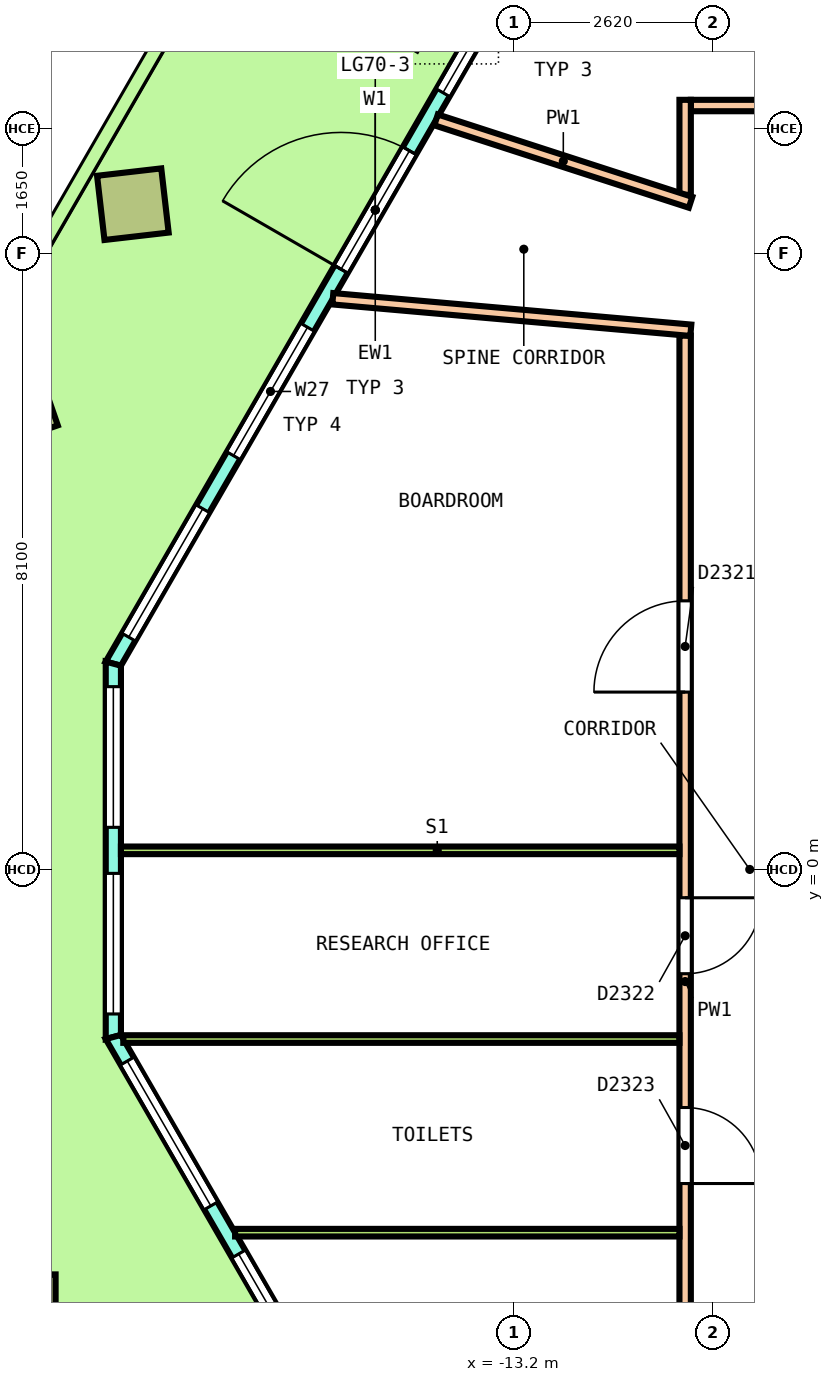
"""IFC4 building model, lengths in metres.
Left out: names, types, materials, properties, quantities, classifications, styles, units other than length and angle.
Written with IfcOpenShell. Run it as: python <this file> out.ifc"""

import sys

from ifc_helpers import new_model, si_unit, direction, frame, frame_2d, origin, origin_2d, place, context, subcontext, project, spatial, polyline, rectangle, outline, extrude, element, fill, save


model = new_model("IFC4")
c1 = context("Model", 3, precision=1e-05, world=origin(), true_north=direction((0.0, 1.0)))
c2 = subcontext(c1, "Body", "Model", "MODEL_VIEW")
j1 = project(units=[si_unit("LENGTHUNIT", "METRE"), si_unit("PLANEANGLEUNIT", "RADIAN")], contexts=[c1])
p1 = place(None, origin())
s1 = spatial("IfcSite", under=j1, at=p1, CompositionType="ELEMENT")
p2 = place(p1, origin())
s2 = spatial("IfcBuilding", under=s1, at=p2, CompositionType="ELEMENT")
p3 = place(p2, frame((0.0, 0.0, 316.6)))
s3 = spatial("IfcBuildingStorey", under=s2, at=p3, CompositionType="ELEMENT", Elevation=316.6)
p4 = place(p3, frame((-18.216, 8.752, 0.0), z_axis=(-0.025405368728, 0.018786601612, 0.999500690765), x_axis=(-0.498611651915, -0.866817929973, 0.00361895723)))
e1 = element("IfcColumn", 1, at=p4, inside=s3, PredefinedType="COLUMN", context=c2, shape_type="SweptSolid", body=[
    extrude(rectangle(XDim=0.85, YDim=0.85, at=origin_2d()), origin(), (0.0, 0.0, 1.0), 3.652),
])
p5 = place(p3, frame((-19.744, 6.105, 0.0), z_axis=(-0.021727128018, 0.025136615799, 0.999447888814), x_axis=(-0.500914849261, -0.865428226672, 0.010876500817)))
e2 = element("IfcColumn", 2, at=p5, inside=s3, PredefinedType="COLUMN", context=c2, shape_type="SweptSolid", body=[
    extrude(rectangle(XDim=0.85, YDim=0.85, at=origin_2d()), origin(), (0.0, 0.0, 1.0), 3.652),
])
p6 = place(p3, frame((-19.657, -5.753, 0.0), z_axis=(-0.010900436936, 0.018791550792, 0.999764001199), x_axis=(0.501923504145, -0.864639146771, 0.021724222837)))
e3 = element("IfcColumn", 3, at=p6, inside=s3, PredefinedType="COLUMN", context=c2, shape_type="SweptSolid", body=[
    extrude(rectangle(XDim=0.85, YDim=0.85, at=origin_2d()), origin(), (0.0, 0.0, 1.0), 3.651),
])
p7 = place(p3, frame((-11.581, 14.644, 0.0), z_axis=(0.0, 0.0, 1.0), x_axis=(-0.500000477412, -0.866025128151, 0.0)))
e4 = element("IfcWall", 4, at=p7, inside=s3, PredefinedType="SOLIDWALL", context=c2, shape_type="SweptSolid", body=[
    extrude(outline(polyline([(-0.027, -0.1), (1.038, -0.1), (2.102, -0.1), (3.167, -0.1), (4.231, -0.1), (5.295, -0.1), (6.36, -0.1), (7.424, -0.1), (8.489, -0.1), (9.553, -0.1), (10.617, -0.1), (11.682, -0.1), (12.746, -0.1), (13.811, -0.1), (13.757, 0.1), (12.701, 0.1), (11.645, 0.1), (10.588, 0.1), (9.532, 0.1), (8.476, 0.1), (7.42, 0.1), (6.364, 0.1), (5.308, 0.1), (4.251, 0.1), (3.195, 0.1), (2.139, 0.1), (1.083, 0.1), (0.027, 0.1), (-0.027, -0.1)])), origin(), (0.0, 0.0, 1.0), 3.7),
])
p8 = place(p7, frame((0.403, 0.0, 0.1)))
e5 = element("IfcOpeningElement", 5, at=p8, cuts=e4, PredefinedType="OPENING", context=c2, shape_type="SweptSolid", body=[
    extrude(rectangle(XDim=1.95, YDim=2.9, at=frame_2d((0.975, 1.45))), frame((0.0, 0.11, 0.0), z_axis=(0.0, -1.0, 0.0), x_axis=(1.0, 0.0, 0.0)), (0.0, 0.0, 1.0), 0.22),
])
p9 = place(p7, frame((3.16, 0.0, 0.1)))
e6 = element("IfcOpeningElement", 6, at=p9, cuts=e4, PredefinedType="OPENING", context=c2, shape_type="SweptSolid", body=[
    extrude(rectangle(XDim=1.95, YDim=2.9, at=frame_2d((0.975, 1.45))), frame((0.0, 0.11, 0.0), z_axis=(0.0, -1.0, 0.0), x_axis=(1.0, 0.0, 0.0)), (0.0, 0.0, 1.0), 0.22),
])
p10 = place(p7, frame((5.992, 0.0, 0.0)))
e7 = element("IfcOpeningElement", 7, at=p10, cuts=e4, PredefinedType="OPENING", context=c2, shape_type="SweptSolid", body=[
    extrude(rectangle(XDim=1.8, YDim=2.4, at=frame_2d((0.9, 1.2))), frame((0.0, 0.11, 0.0), z_axis=(0.0, -1.0, 0.0), x_axis=(1.0, 0.0, 0.0)), (0.0, 0.0, 1.0), 0.22),
])
p11 = place(p7, frame((5.992, 0.0, 2.55)))
e8 = element("IfcOpeningElement", 8, at=p11, cuts=e4, PredefinedType="OPENING", context=c2, shape_type="SweptSolid", body=[
    extrude(rectangle(XDim=1.8, YDim=0.45, at=frame_2d((0.9, 0.225))), frame((0.0, 0.11, 0.0), z_axis=(0.0, -1.0, 0.0), x_axis=(1.0, 0.0, 0.0)), (0.0, 0.0, 1.0), 0.22),
])
p12 = place(p7, frame((8.674, 0.0, 0.1)))
e9 = element("IfcOpeningElement", 9, at=p12, cuts=e4, PredefinedType="OPENING", context=c2, shape_type="SweptSolid", body=[
    extrude(rectangle(XDim=1.95, YDim=2.9, at=frame_2d((0.975, 1.45))), frame((0.0, 0.11, 0.0), z_axis=(0.0, -1.0, 0.0), x_axis=(1.0, 0.0, 0.0)), (0.0, 0.0, 1.0), 0.22),
])
p13 = place(p7, frame((11.43, 0.0, 0.1)))
e10 = element("IfcOpeningElement", 10, at=p13, cuts=e4, PredefinedType="OPENING", context=c2, shape_type="SweptSolid", body=[
    extrude(rectangle(XDim=1.95, YDim=2.9, at=frame_2d((0.975, 1.45))), frame((0.0, 0.11, 0.0), z_axis=(0.0, -1.0, 0.0), x_axis=(1.0, 0.0, 0.0)), (0.0, 0.0, 1.0), 0.22),
])
p14 = place(p3, frame((-18.473, 2.707, 0.0), z_axis=(0.0, 0.0, 1.0), x_axis=(0.0, -1.0, 0.0)))
e11 = element("IfcWall", 11, at=p14, inside=s3, PredefinedType="SOLIDWALL", context=c2, shape_type="SweptSolid", body=[
    extrude(outline(polyline([(-0.027, -0.1), (1.214, -0.1), (2.456, -0.1), (3.697, -0.1), (4.938, -0.1), (4.885, 0.1), (3.67, 0.1), (2.456, 0.1), (1.241, 0.1), (0.027, 0.1), (-0.027, -0.1)])), origin(), (0.0, 0.0, 1.0), 3.7),
])
p15 = place(p14, frame((0.303, 0.0, 0.1)))
e12 = element("IfcOpeningElement", 12, at=p15, cuts=e11, PredefinedType="OPENING", context=c2, shape_type="SweptSolid", body=[
    extrude(rectangle(XDim=1.85, YDim=2.9, at=frame_2d((0.925, 1.45))), frame((0.0, 0.11, 0.0), z_axis=(0.0, -1.0, 0.0), x_axis=(1.0, 0.0, 0.0)), (0.0, 0.0, 1.0), 0.22),
])
p16 = place(p14, frame((2.759, 0.0, 0.1)))
e13 = element("IfcOpeningElement", 13, at=p16, cuts=e11, PredefinedType="OPENING", context=c2, shape_type="SweptSolid", body=[
    extrude(rectangle(XDim=1.85, YDim=2.9, at=frame_2d((0.925, 1.45))), frame((0.0, 0.11, 0.0), z_axis=(0.0, -1.0, 0.0), x_axis=(1.0, 0.0, 0.0)), (0.0, 0.0, 1.0), 0.22),
])
p17 = place(p3, frame((-18.473, -2.204, 0.0), z_axis=(0.0, 0.0, 1.0), x_axis=(0.499995013995, -0.866028282437, 0.0)))
e14 = element("IfcWall", 14, at=p17, inside=s3, PredefinedType="SOLIDWALL", context=c2, shape_type="SweptSolid", body=[
    extrude(outline(polyline([(-0.027, -0.1), (1.024, -0.1), (2.074, -0.1), (3.125, -0.1), (4.176, -0.1), (5.226, -0.1), (6.277, -0.1), (7.327, -0.1), (8.378, -0.1), (9.428, -0.1), (10.479, -0.1), (11.53, -0.1), (12.58, -0.1), (13.631, -0.1), (14.681, -0.1), (14.628, 0.1), (13.585, 0.1), (12.542, 0.1), (11.499, 0.1), (10.456, 0.1), (9.413, 0.1), (8.37, 0.1), (7.327, 0.1), (6.284, 0.1), (5.241, 0.1), (4.198, 0.1), (3.156, 0.1), (2.113, 0.1), (1.07, 0.1), (0.027, 0.1), (-0.027, -0.1)])), origin(), (0.0, 0.0, 1.0), 3.7),
])
p18 = place(p17, frame((0.365, 0.0, 0.1)))
e15 = element("IfcOpeningElement", 15, at=p18, cuts=e14, PredefinedType="OPENING", context=c2, shape_type="SweptSolid", body=[
    extrude(rectangle(XDim=2.2, YDim=2.9, at=frame_2d((1.1, 1.45))), frame((0.0, 0.11, 0.0), z_axis=(0.0, -1.0, 0.0), x_axis=(1.0, 0.0, 0.0)), (0.0, 0.0, 1.0), 0.22),
])
p19 = place(p17, frame((3.296, 0.0, 0.1)))
e16 = element("IfcOpeningElement", 16, at=p19, cuts=e14, PredefinedType="OPENING", context=c2, shape_type="SweptSolid", body=[
    extrude(rectangle(XDim=2.2, YDim=2.9, at=frame_2d((1.1, 1.45))), frame((0.0, 0.11, 0.0), z_axis=(0.0, -1.0, 0.0), x_axis=(1.0, 0.0, 0.0)), (0.0, 0.0, 1.0), 0.22),
])
p20 = place(p17, frame((6.427, 0.0, 0.0)))
e17 = element("IfcOpeningElement", 17, at=p20, cuts=e14, PredefinedType="OPENING", context=c2, shape_type="SweptSolid", body=[
    extrude(rectangle(XDim=1.8, YDim=2.4, at=frame_2d((0.9, 1.2))), frame((0.0, 0.11, 0.0), z_axis=(0.0, -1.0, 0.0), x_axis=(1.0, 0.0, 0.0)), (0.0, 0.0, 1.0), 0.22),
])
p21 = place(p17, frame((6.427, 0.0, 2.55)))
e18 = element("IfcOpeningElement", 18, at=p21, cuts=e14, PredefinedType="OPENING", context=c2, shape_type="SweptSolid", body=[
    extrude(rectangle(XDim=1.8, YDim=0.45, at=frame_2d((0.9, 0.225))), frame((0.0, 0.11, 0.0), z_axis=(0.0, -1.0, 0.0), x_axis=(1.0, 0.0, 0.0)), (0.0, 0.0, 1.0), 0.22),
])
p22 = place(p17, frame((9.158, 0.0, 0.1)))
e19 = element("IfcOpeningElement", 19, at=p22, cuts=e14, PredefinedType="OPENING", context=c2, shape_type="SweptSolid", body=[
    extrude(rectangle(XDim=2.2, YDim=2.9, at=frame_2d((1.1, 1.45))), frame((0.0, 0.11, 0.0), z_axis=(0.0, -1.0, 0.0), x_axis=(1.0, 0.0, 0.0)), (0.0, 0.0, 1.0), 0.22),
])
p23 = place(p17, frame((12.089, 0.0, 0.1)))
e20 = element("IfcOpeningElement", 20, at=p23, cuts=e14, PredefinedType="OPENING", context=c2, shape_type="SweptSolid", body=[
    extrude(rectangle(XDim=2.2, YDim=2.9, at=frame_2d((1.1, 1.45))), frame((0.0, 0.11, 0.0), z_axis=(0.0, -1.0, 0.0), x_axis=(1.0, 0.0, 0.0)), (0.0, 0.0, 1.0), 0.22),
])
p24 = place(p3, frame((-10.875, 10.05, 0.0), z_axis=(0.0, 0.0, 1.0), x_axis=(1.0, 0.0, 0.0)))
e21 = element("IfcWall", 21, at=p24, inside=s3, PredefinedType="PARTITIONING", context=c2, shape_type="SweptSolid", body=[
    extrude(rectangle(XDim=21.775, YDim=0.15, at=frame_2d((10.887, 0.0))), origin(), (0.0, 0.0, 1.0), 3.05),
])
p25 = place(p24, frame((17.26, 0.0, 0.0)))
e22 = element("IfcOpeningElement", 22, at=p25, cuts=e21, PredefinedType="OPENING", context=c2, shape_type="SweptSolid", body=[
    extrude(rectangle(XDim=1.2, YDim=2.1, at=frame_2d((0.6, 1.05))), frame((0.0, 0.085, 0.0), z_axis=(0.0, -1.0, 0.0), x_axis=(1.0, 0.0, 0.0)), (0.0, 0.0, 1.0), 0.17),
])
p26 = place(p24, frame((11.746, 0.0, 0.0)))
e23 = element("IfcOpeningElement", 23, at=p26, cuts=e21, PredefinedType="OPENING", context=c2, shape_type="SweptSolid", body=[
    extrude(rectangle(XDim=1.2, YDim=2.1, at=frame_2d((0.6, 1.05))), frame((0.0, 0.085, 0.0), z_axis=(0.0, -1.0, 0.0), x_axis=(1.0, 0.0, 0.0)), (0.0, 0.0, 1.0), 0.17),
])
p27 = place(p24, frame((5.963, 0.0, 0.0)))
e24 = element("IfcOpeningElement", 24, at=p27, cuts=e21, PredefinedType="OPENING", context=c2, shape_type="SweptSolid", body=[
    extrude(rectangle(XDim=1.0, YDim=2.1, at=frame_2d((0.5, 1.05))), frame((0.0, 0.085, 0.0), z_axis=(0.0, -1.0, 0.0), x_axis=(1.0, 0.0, 0.0)), (0.0, 0.0, 1.0), 0.17),
])
p28 = place(p24, frame((1.223, 0.0, 0.0)))
e25 = element("IfcOpeningElement", 25, at=p28, cuts=e21, PredefinedType="OPENING", context=c2, shape_type="SweptSolid", body=[
    extrude(rectangle(XDim=1.0, YDim=2.1, at=frame_2d((0.5, 1.05))), frame((0.0, 0.085, 0.0), z_axis=(0.0, -1.0, 0.0), x_axis=(1.0, 0.0, 0.0)), (0.0, 0.0, 1.0), 0.17),
])
p29 = place(p3, frame((-10.95, -9.975, 0.0), z_axis=(0.0, 0.0, 1.0), x_axis=(0.0, 1.0, 0.0)))
e26 = element("IfcWall", 26, at=p29, inside=s3, PredefinedType="PARTITIONING", context=c2, shape_type="SweptSolid", body=[
    extrude(rectangle(XDim=17.0, YDim=0.15, at=frame_2d((8.5, 0.0))), origin(), (0.0, 0.0, 1.0), 3.05),
])
p30 = place(p29, frame((12.308, 0.0, 0.0)))
e27 = element("IfcOpeningElement", 27, at=p30, cuts=e26, PredefinedType="OPENING", context=c2, shape_type="SweptSolid", body=[
    extrude(rectangle(XDim=1.2, YDim=2.1, at=frame_2d((0.6, 1.05))), frame((0.0, 0.085, 0.0), z_axis=(0.0, -1.0, 0.0), x_axis=(1.0, 0.0, 0.0)), (0.0, 0.0, 1.0), 0.17),
])
p31 = place(p29, frame((8.603, 0.0, 0.0)))
e28 = element("IfcOpeningElement", 28, at=p31, cuts=e26, PredefinedType="OPENING", context=c2, shape_type="SweptSolid", body=[
    extrude(rectangle(XDim=1.0, YDim=2.1, at=frame_2d((0.5, 1.05))), frame((0.0, 0.085, 0.0), z_axis=(0.0, -1.0, 0.0), x_axis=(1.0, 0.0, 0.0)), (0.0, 0.0, 1.0), 0.17),
])
p32 = place(p29, frame((5.843, 0.0, 0.0)))
e29 = element("IfcOpeningElement", 29, at=p32, cuts=e26, PredefinedType="OPENING", context=c2, shape_type="SweptSolid", body=[
    extrude(rectangle(XDim=1.0, YDim=2.1, at=frame_2d((0.5, 1.05))), frame((0.0, 0.085, 0.0), z_axis=(0.0, -1.0, 0.0), x_axis=(1.0, 0.0, 0.0)), (0.0, 0.0, 1.0), 0.17),
])
p33 = place(p29, frame((1.525, 0.0, 0.0)))
e30 = element("IfcOpeningElement", 30, at=p33, cuts=e26, PredefinedType="OPENING", context=c2, shape_type="SweptSolid", body=[
    extrude(rectangle(XDim=1.0, YDim=2.1, at=frame_2d((0.5, 1.05))), frame((0.0, 0.085, 0.0), z_axis=(0.0, -1.0, 0.0), x_axis=(1.0, 0.0, 0.0)), (0.0, 0.0, 1.0), 0.17),
])
p34 = place(p3, frame((-10.95, 8.875, 0.0), z_axis=(0.0, 0.0, 1.0), x_axis=(0.0, 1.0, 0.0)))
e31 = element("IfcWall", 31, at=p34, inside=s3, PredefinedType="PARTITIONING", context=c2, shape_type="SweptSolid", body=[
    extrude(rectangle(XDim=1.25, YDim=0.15, at=frame_2d((0.625, 0.0))), origin(), (0.0, 0.0, 1.0), 3.05),
])
p35 = place(p3, frame((-14.227, 9.861, 0.0), z_axis=(0.0, 0.0, 1.0), x_axis=(0.951360824749, -0.308078855382, 0.0)))
e32 = element("IfcWall", 32, at=p35, inside=s3, PredefinedType="PARTITIONING", context=c2, shape_type="SweptSolid", body=[
    extrude(rectangle(XDim=3.519, YDim=0.15, at=frame_2d((1.76, 0.0))), origin(), (0.0, 0.0, 1.0), 3.05),
])
p36 = place(p3, frame((-15.585, 7.508, 0.0), z_axis=(0.0, 0.0, 1.0), x_axis=(0.996149370473, -0.087672297261, 0.0)))
e33 = element("IfcWall", 33, at=p36, inside=s3, PredefinedType="PARTITIONING", context=c2, shape_type="SweptSolid", body=[
    extrude(rectangle(XDim=4.729, YDim=0.15, at=frame_2d((2.364, 0.0))), origin(), (0.0, 0.0, 1.0), 3.05),
])
p37 = place(p3, frame((-18.373, 0.251, 0.0), z_axis=(0.0, 0.0, 1.0), x_axis=(1.0, 0.0, 0.0)))
e34 = element("IfcWall", 34, at=p37, inside=s3, PredefinedType="PARTITIONING", context=c2, shape_type="SweptSolid", body=[
    extrude(rectangle(XDim=7.348, YDim=0.1, at=frame_2d((3.674, 0.0))), origin(), (0.0, 0.0, 1.0), 3.05),
])
p38 = place(p3, frame((-18.342, -2.231, 0.0), z_axis=(0.0, 0.0, 1.0), x_axis=(1.0, 0.0, 0.0)))
e35 = element("IfcWall", 35, at=p38, inside=s3, PredefinedType="PARTITIONING", context=c2, shape_type="SweptSolid", body=[
    extrude(rectangle(XDim=7.317, YDim=0.1, at=frame_2d((3.658, 0.0))), origin(), (0.0, 0.0, 1.0), 3.05),
])
p39 = place(p3, frame((-16.871, -4.779, 0.0), z_axis=(0.0, 0.0, 1.0), x_axis=(1.0, 0.0, 0.0)))
e36 = element("IfcWall", 36, at=p39, inside=s3, PredefinedType="PARTITIONING", context=c2, shape_type="SweptSolid", body=[
    extrude(rectangle(XDim=5.846, YDim=0.1, at=frame_2d((2.923, 0.0))), origin(), (0.0, 0.0, 1.0), 3.05),
])
p40 = place(p9, origin())
e37 = element("IfcWindow", 37, at=p40, inside=s3, PartitioningType="SINGLE_PANEL", PredefinedType="WINDOW", context=c2, shape_type="SweptSolid", body=[
    extrude(rectangle(XDim=1.95, YDim=2.9, at=frame_2d((0.975, 1.45))), frame((0.0, 0.03, 0.0), z_axis=(0.0, -1.0, 0.0), x_axis=(1.0, 0.0, 0.0)), (0.0, 0.0, 1.0), 0.06),
])
fill(e6, e37)
p41 = place(p10, origin())
e38 = element("IfcDoor", 38, at=p41, inside=s3, OperationType="DOUBLE_DOOR_SINGLE_SWING", PredefinedType="DOOR", context=c2, shape_type="SweptSolid", body=[
    extrude(rectangle(XDim=1.8, YDim=2.4, at=frame_2d((0.9, 1.2))), frame((0.0, 0.025, 0.0), z_axis=(0.0, -1.0, 0.0), x_axis=(1.0, 0.0, 0.0)), (0.0, 0.0, 1.0), 0.05),
])
fill(e7, e38)
p42 = place(p11, origin())
e39 = element("IfcWindow", 39, at=p42, inside=s3, PartitioningType="SINGLE_PANEL", PredefinedType="WINDOW", context=c2, shape_type="SweptSolid", body=[
    extrude(rectangle(XDim=1.8, YDim=0.45, at=frame_2d((0.9, 0.225))), frame((0.0, 0.03, 0.0), z_axis=(0.0, -1.0, 0.0), x_axis=(1.0, 0.0, 0.0)), (0.0, 0.0, 1.0), 0.06),
])
fill(e8, e39)
p43 = place(p12, origin())
e40 = element("IfcWindow", 40, at=p43, inside=s3, PartitioningType="SINGLE_PANEL", PredefinedType="WINDOW", context=c2, shape_type="SweptSolid", body=[
    extrude(rectangle(XDim=1.95, YDim=2.9, at=frame_2d((0.975, 1.45))), frame((0.0, 0.03, 0.0), z_axis=(0.0, -1.0, 0.0), x_axis=(1.0, 0.0, 0.0)), (0.0, 0.0, 1.0), 0.06),
])
fill(e9, e40)
p44 = place(p13, origin())
e41 = element("IfcWindow", 41, at=p44, inside=s3, PartitioningType="SINGLE_PANEL", PredefinedType="WINDOW", context=c2, shape_type="SweptSolid", body=[
    extrude(rectangle(XDim=1.95, YDim=2.9, at=frame_2d((0.975, 1.45))), frame((0.0, 0.03, 0.0), z_axis=(0.0, -1.0, 0.0), x_axis=(1.0, 0.0, 0.0)), (0.0, 0.0, 1.0), 0.06),
])
fill(e10, e41)
p45 = place(p15, origin())
e42 = element("IfcWindow", 42, at=p45, inside=s3, PartitioningType="SINGLE_PANEL", PredefinedType="WINDOW", context=c2, shape_type="SweptSolid", body=[
    extrude(rectangle(XDim=1.85, YDim=2.9, at=frame_2d((0.925, 1.45))), frame((0.0, 0.03, 0.0), z_axis=(0.0, -1.0, 0.0), x_axis=(1.0, 0.0, 0.0)), (0.0, 0.0, 1.0), 0.06),
])
fill(e12, e42)
p46 = place(p16, origin())
e43 = element("IfcWindow", 43, at=p46, inside=s3, PartitioningType="SINGLE_PANEL", PredefinedType="WINDOW", context=c2, shape_type="SweptSolid", body=[
    extrude(rectangle(XDim=1.85, YDim=2.9, at=frame_2d((0.925, 1.45))), frame((0.0, 0.03, 0.0), z_axis=(0.0, -1.0, 0.0), x_axis=(1.0, 0.0, 0.0)), (0.0, 0.0, 1.0), 0.06),
])
fill(e13, e43)
p47 = place(p18, origin())
e44 = element("IfcWindow", 44, at=p47, inside=s3, PartitioningType="SINGLE_PANEL", PredefinedType="WINDOW", context=c2, shape_type="SweptSolid", body=[
    extrude(rectangle(XDim=2.2, YDim=2.9, at=frame_2d((1.1, 1.45))), frame((0.0, 0.03, 0.0), z_axis=(0.0, -1.0, 0.0), x_axis=(1.0, 0.0, 0.0)), (0.0, 0.0, 1.0), 0.06),
])
fill(e15, e44)
p48 = place(p19, origin())
e45 = element("IfcWindow", 45, at=p48, inside=s3, PartitioningType="SINGLE_PANEL", PredefinedType="WINDOW", context=c2, shape_type="SweptSolid", body=[
    extrude(rectangle(XDim=2.2, YDim=2.9, at=frame_2d((1.1, 1.45))), frame((0.0, 0.03, 0.0), z_axis=(0.0, -1.0, 0.0), x_axis=(1.0, 0.0, 0.0)), (0.0, 0.0, 1.0), 0.06),
])
fill(e16, e45)
p49 = place(p30, origin())
e46 = element("IfcDoor", 46, at=p49, inside=s3, OperationType="DOUBLE_DOOR_SINGLE_SWING", PredefinedType="DOOR", context=c2, shape_type="SweptSolid", body=[
    extrude(rectangle(XDim=1.2, YDim=2.1, at=frame_2d((0.6, 1.05))), frame((0.0, 0.025, 0.0), z_axis=(0.0, -1.0, 0.0), x_axis=(1.0, 0.0, 0.0)), (0.0, 0.0, 1.0), 0.05),
])
fill(e27, e46)
p50 = place(p31, origin())
e47 = element("IfcDoor", 47, at=p50, inside=s3, OperationType="SINGLE_SWING_RIGHT", PredefinedType="DOOR", context=c2, shape_type="SweptSolid", body=[
    extrude(rectangle(XDim=1.0, YDim=2.1, at=frame_2d((0.5, 1.05))), frame((0.0, 0.025, 0.0), z_axis=(0.0, -1.0, 0.0), x_axis=(1.0, 0.0, 0.0)), (0.0, 0.0, 1.0), 0.05),
])
fill(e28, e47)
p51 = place(p32, origin())
e48 = element("IfcDoor", 48, at=p51, inside=s3, OperationType="SINGLE_SWING_RIGHT", PredefinedType="DOOR", context=c2, shape_type="SweptSolid", body=[
    extrude(rectangle(XDim=1.0, YDim=2.1, at=frame_2d((0.5, 1.05))), frame((0.0, 0.025, 0.0), z_axis=(0.0, -1.0, 0.0), x_axis=(1.0, 0.0, 0.0)), (0.0, 0.0, 1.0), 0.05),
])
fill(e29, e48)
save(model, sys.argv[1])
